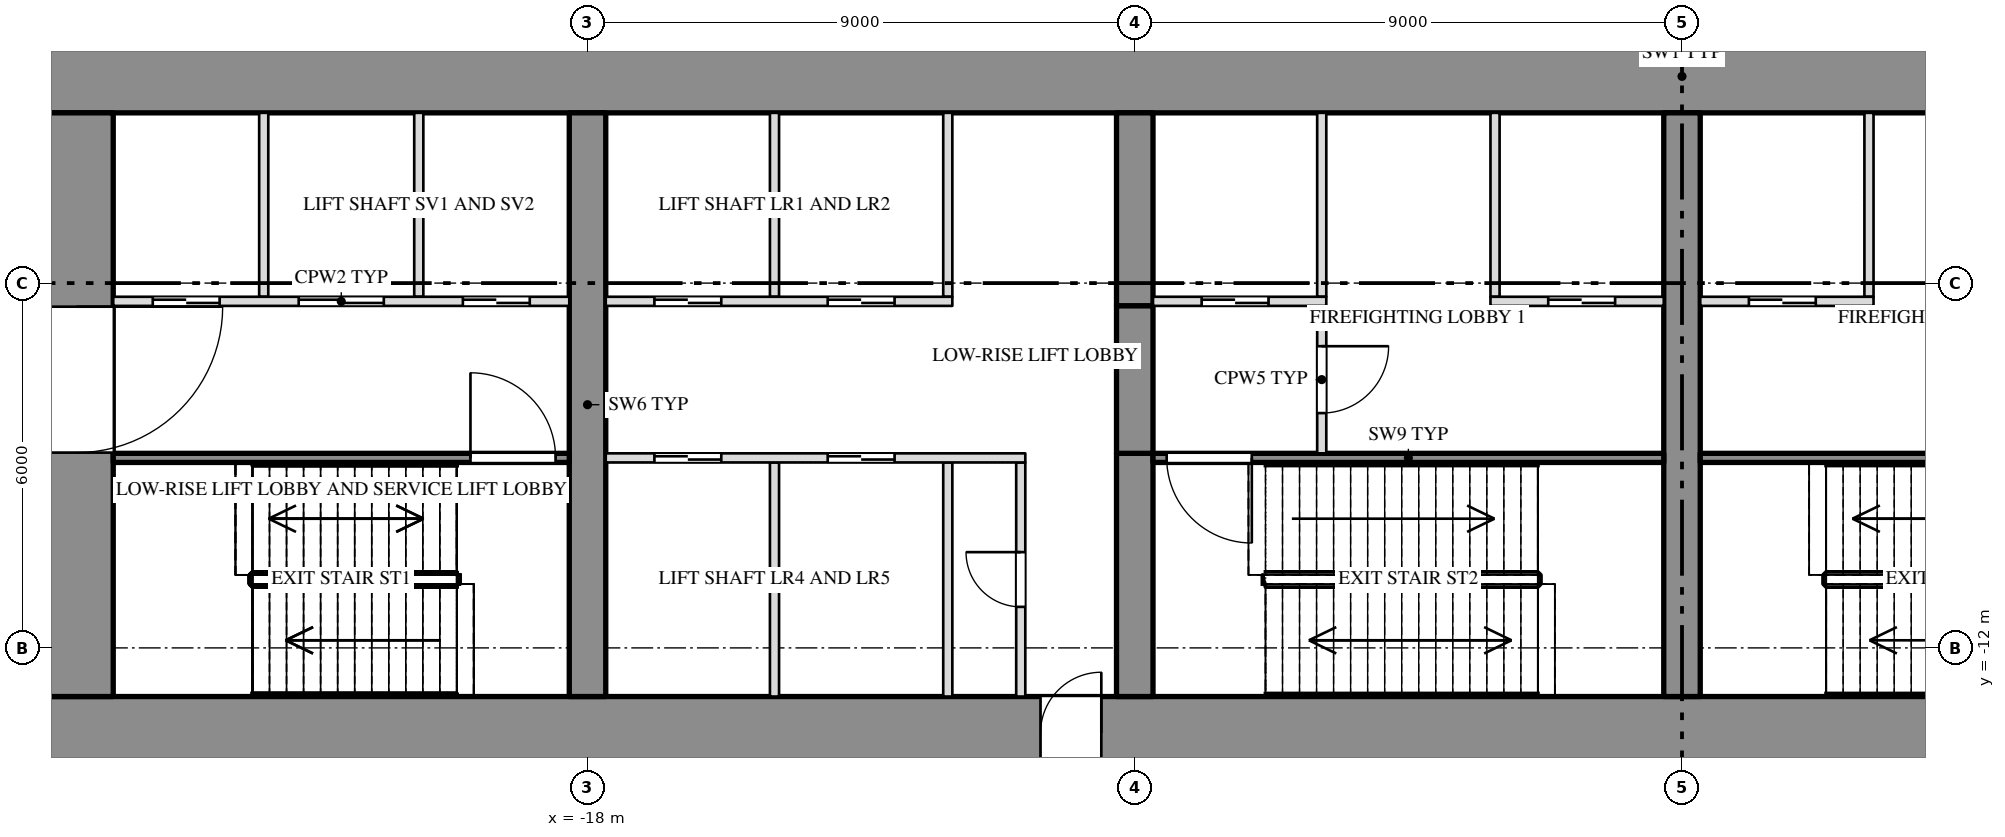
"""IFC4 building model, lengths in metres.
Left out: names, types, materials, properties, quantities, classifications, styles, units other than length and angle.
Written with IfcOpenShell. Run it as: python <this file> out.ifc"""

import sys

from ifc_helpers import new_model, si_unit, direction, frame, frame_2d, origin, place, context, subcontext, project, spatial, rectangle, extrude, element, fill, save


model = new_model("IFC4")
c1 = context("Model", 3, precision=1e-05, world=origin(), true_north=direction((0.0, 1.0)))
c2 = subcontext(c1, "Body", "Model", "MODEL_VIEW")
j1 = project(units=[si_unit("LENGTHUNIT", "METRE"), si_unit("PLANEANGLEUNIT", "RADIAN")], contexts=[c1])
p1 = place(None, origin())
s1 = spatial("IfcSite", under=j1, at=p1, CompositionType="ELEMENT")
p2 = place(p1, origin())
s2 = spatial("IfcBuilding", under=s1, at=p2, CompositionType="ELEMENT")
p3 = place(p2, frame((0.0, 0.0, 27.0)))
s3 = spatial("IfcBuildingStorey", under=s2, at=p3, CompositionType="ELEMENT", Elevation=27.0)
p4 = place(p3, frame((-27.0, -2.6, 0.0), z_axis=(0.0, 0.0, 1.0), x_axis=(1.0, 0.0, 0.0)))
e1 = element("IfcWall", 1, at=p4, inside=s3, PredefinedType="SHEAR", context=c2, shape_type="SweptSolid", body=[
    extrude(rectangle(XDim=54.0, YDim=1.2, at=frame_2d((27.0, 0.0))), origin(), (0.0, 0.0, 1.0), 5.7),
])
p5 = place(p3, frame((-27.0, -13.4, 0.0), z_axis=(0.0, 0.0, 1.0), x_axis=(1.0, 0.0, 0.0)))
e2 = element("IfcWall", 2, at=p5, inside=s3, PredefinedType="SHEAR", context=c2, shape_type="SweptSolid", body=[
    extrude(rectangle(XDim=54.0, YDim=1.2, at=frame_2d((27.0, 0.0))), origin(), (0.0, 0.0, 1.0), 5.7),
])
p6 = place(p5, frame((16.45, 0.0, 0.0)))
e3 = element("IfcOpeningElement", 3, at=p6, cuts=e2, PredefinedType="OPENING", context=c2, shape_type="SweptSolid", body=[
    extrude(rectangle(XDim=1.0, YDim=2.1, at=frame_2d((0.5, 1.05))), frame((0.0, 0.612, 0.0), z_axis=(0.0, -1.0, 0.0), x_axis=(1.0, 0.0, 0.0)), (0.0, 0.0, 1.0), 1.224),
])
p7 = place(p5, frame((36.55, 0.0, 0.0)))
e4 = element("IfcOpeningElement", 4, at=p7, cuts=e2, PredefinedType="OPENING", context=c2, shape_type="SweptSolid", body=[
    extrude(rectangle(XDim=1.0, YDim=2.1, at=frame_2d((0.5, 1.05))), frame((0.0, 0.612, 0.0), z_axis=(0.0, -1.0, 0.0), x_axis=(1.0, 0.0, 0.0)), (0.0, 0.0, 1.0), 1.224),
])
p8 = place(p3, frame((-26.4, -12.8, 0.0), z_axis=(0.0, 0.0, 1.0), x_axis=(0.0, 1.0, 0.0)))
e5 = element("IfcWall", 5, at=p8, inside=s3, PredefinedType="SHEAR", context=c2, shape_type="SweptSolid", body=[
    extrude(rectangle(XDim=9.6, YDim=1.2, at=frame_2d((4.8, 0.0))), origin(), (0.0, 0.0, 1.0), 5.7),
])
p9 = place(p8, frame((4.012, 0.0, 0.0)))
e6 = element("IfcOpeningElement", 6, at=p9, cuts=e5, PredefinedType="OPENING", context=c2, shape_type="SweptSolid", body=[
    extrude(rectangle(XDim=2.4, YDim=2.1, at=frame_2d((1.2, 1.05))), frame((0.0, 0.612, 0.0), z_axis=(0.0, -1.0, 0.0), x_axis=(1.0, 0.0, 0.0)), (0.0, 0.0, 1.0), 1.224),
])
p10 = place(p3, frame((-18.0, -12.8, 0.0), z_axis=(0.0, 0.0, 1.0), x_axis=(0.0, 1.0, 0.0)))
e7 = element("IfcWall", 7, at=p10, inside=s3, PredefinedType="SHEAR", context=c2, shape_type="SweptSolid", body=[
    extrude(rectangle(XDim=9.6, YDim=0.6, at=frame_2d((4.8, 0.0))), origin(), (0.0, 0.0, 1.0), 5.7),
])
p11 = place(p3, frame((-9.0, -12.8, 0.0), z_axis=(0.0, 0.0, 1.0), x_axis=(0.0, 1.0, 0.0)))
e8 = element("IfcWall", 8, at=p11, inside=s3, PredefinedType="SHEAR", context=c2, shape_type="SweptSolid", body=[
    extrude(rectangle(XDim=4.0, YDim=0.6, at=frame_2d((2.0, 0.0))), origin(), (0.0, 0.0, 1.0), 5.7),
])
p12 = place(p3, frame((-9.0, -6.375, 0.0), z_axis=(0.0, 0.0, 1.0), x_axis=(0.0, 1.0, 0.0)))
e9 = element("IfcWall", 9, at=p12, inside=s3, PredefinedType="SHEAR", context=c2, shape_type="SweptSolid", body=[
    extrude(rectangle(XDim=3.175, YDim=0.6, at=frame_2d((1.587, 0.0))), origin(), (0.0, 0.0, 1.0), 5.7),
])
p13 = place(p3, frame((-9.0, -8.8, 3.6), z_axis=(0.0, 0.0, 1.0), x_axis=(0.0, 1.0, 0.0)))
e10 = element("IfcWall", 10, at=p13, inside=s3, PredefinedType="SHEAR", context=c2, shape_type="SweptSolid", body=[
    extrude(rectangle(XDim=2.425, YDim=0.6, at=frame_2d((1.212, 0.0))), origin(), (0.0, 0.0, 1.0), 2.1),
])
p14 = place(p3, frame((0.0, -12.8, 0.0), z_axis=(0.0, 0.0, 1.0), x_axis=(0.0, 1.0, 0.0)))
e11 = element("IfcWall", 11, at=p14, inside=s3, PredefinedType="SHEAR", context=c2, shape_type="SweptSolid", body=[
    extrude(rectangle(XDim=9.6, YDim=0.6, at=frame_2d((4.8, 0.0))), origin(), (0.0, 0.0, 1.0), 5.7),
])
for number, where, z_axis, x_axis in (
    (12, (-20.775, -6.225, 0.0), (0.0, 0.0, 1.0), (0.0, 1.0, 0.0)),
    (13, (-23.325, -6.225, 0.0), (0.0, 0.0, 1.0), (0.0, 1.0, 0.0)),
    (14, (-12.075, -6.225, 0.0), (0.0, 0.0, 1.0), (0.0, 1.0, 0.0)),
    (15, (-14.925, -6.225, 0.0), (0.0, 0.0, 1.0), (0.0, 1.0, 0.0)),
    (16, (-3.075, -6.225, 0.0), (0.0, 0.0, 1.0), (0.0, 1.0, 0.0)),
    (17, (-5.925, -6.225, 0.0), (0.0, 0.0, 1.0), (0.0, 1.0, 0.0)),
    (18, (3.075, -6.225, 0.0), (0.0, 0.0, 1.0), (0.0, 1.0, 0.0)),
):
    element("IfcWall", number, at=place(p3, frame(where, z_axis=z_axis, x_axis=x_axis)), inside=s3, PredefinedType="PARTITIONING", context=c2, shape_type="SweptSolid", body=[
        extrude(rectangle(XDim=3.025, YDim=0.15, at=frame_2d((1.513, 0.0))), origin(), (0.0, 0.0, 1.0), 5.7),
    ])
p15 = place(p3, frame((-10.875, -12.8, 0.0), z_axis=(0.0, 0.0, 1.0), x_axis=(0.0, 1.0, 0.0)))
e19 = element("IfcWall", 19, at=p15, inside=s3, PredefinedType="PARTITIONING", context=c2, shape_type="SweptSolid", body=[
    extrude(rectangle(XDim=3.85, YDim=0.15, at=frame_2d((1.925, 0.0))), origin(), (0.0, 0.0, 1.0), 5.7),
])
p16 = place(p15, frame((1.475, 0.0, 0.0)))
e20 = element("IfcOpeningElement", 20, at=p16, cuts=e19, PredefinedType="OPENING", context=c2, shape_type="SweptSolid", body=[
    extrude(rectangle(XDim=0.9, YDim=2.1, at=frame_2d((0.45, 1.05))), frame((0.0, 0.087, 0.0), z_axis=(0.0, -1.0, 0.0), x_axis=(1.0, 0.0, 0.0)), (0.0, 0.0, 1.0), 0.174),
])
for number, where, z_axis, x_axis in (
    (21, (-12.075, -12.8, 0.0), (0.0, 0.0, 1.0), (0.0, 1.0, 0.0)),
    (22, (-14.925, -12.8, 0.0), (0.0, 0.0, 1.0), (0.0, 1.0, 0.0)),
):
    element("IfcWall", number, at=place(p3, frame(where, z_axis=z_axis, x_axis=x_axis)), inside=s3, PredefinedType="PARTITIONING", context=c2, shape_type="SweptSolid", body=[
        extrude(rectangle(XDim=3.85, YDim=0.15, at=frame_2d((1.925, 0.0))), origin(), (0.0, 0.0, 1.0), 5.7),
    ])
p17 = place(p3, frame((-5.925, -8.8, 0.0), z_axis=(0.0, 0.0, 1.0), x_axis=(0.0, 1.0, 0.0)))
e23 = element("IfcWall", 23, at=p17, inside=s3, PredefinedType="PARTITIONING", context=c2, shape_type="SweptSolid", body=[
    extrude(rectangle(XDim=2.425, YDim=0.15, at=frame_2d((1.212, 0.0))), origin(), (0.0, 0.0, 1.0), 5.7),
])
p18 = place(p17, frame((0.662, 0.0, 0.0)))
e24 = element("IfcOpeningElement", 24, at=p18, cuts=e23, PredefinedType="OPENING", context=c2, shape_type="SweptSolid", body=[
    extrude(rectangle(XDim=1.1, YDim=2.1, at=frame_2d((0.55, 1.05))), frame((0.0, 0.087, 0.0), z_axis=(0.0, -1.0, 0.0), x_axis=(1.0, 0.0, 0.0)), (0.0, 0.0, 1.0), 0.174),
])
p19 = place(p3, frame((-25.8, -6.3, 0.0), z_axis=(0.0, 0.0, 1.0), x_axis=(1.0, 0.0, 0.0)))
e25 = element("IfcWall", 25, at=p19, inside=s3, PredefinedType="PARTITIONING", context=c2, shape_type="SweptSolid", body=[
    extrude(rectangle(XDim=7.5, YDim=0.15, at=frame_2d((3.75, 0.0))), origin(), (0.0, 0.0, 1.0), 5.7),
])
p20 = place(p19, frame((0.65, 0.0, 0.0)))
e26 = element("IfcOpeningElement", 26, at=p20, cuts=e25, PredefinedType="OPENING", context=c2, shape_type="SweptSolid", body=[
    extrude(rectangle(XDim=1.1, YDim=2.1, at=frame_2d((0.55, 1.05))), frame((0.0, 0.087, 0.0), z_axis=(0.0, -1.0, 0.0), x_axis=(1.0, 0.0, 0.0)), (0.0, 0.0, 1.0), 0.174),
])
p21 = place(p19, frame((3.05, 0.0, 0.0)))
e27 = element("IfcOpeningElement", 27, at=p21, cuts=e25, PredefinedType="OPENING", context=c2, shape_type="SweptSolid", body=[
    extrude(rectangle(XDim=1.4, YDim=2.1, at=frame_2d((0.7, 1.05))), frame((0.0, 0.087, 0.0), z_axis=(0.0, -1.0, 0.0), x_axis=(1.0, 0.0, 0.0)), (0.0, 0.0, 1.0), 0.174),
])
p22 = place(p19, frame((5.75, 0.0, 0.0)))
e28 = element("IfcOpeningElement", 28, at=p22, cuts=e25, PredefinedType="OPENING", context=c2, shape_type="SweptSolid", body=[
    extrude(rectangle(XDim=1.1, YDim=2.1, at=frame_2d((0.55, 1.05))), frame((0.0, 0.087, 0.0), z_axis=(0.0, -1.0, 0.0), x_axis=(1.0, 0.0, 0.0)), (0.0, 0.0, 1.0), 0.174),
])
p23 = place(p3, frame((-17.7, -6.3, 0.0), z_axis=(0.0, 0.0, 1.0), x_axis=(1.0, 0.0, 0.0)))
e29 = element("IfcWall", 29, at=p23, inside=s3, PredefinedType="PARTITIONING", context=c2, shape_type="SweptSolid", body=[
    extrude(rectangle(XDim=5.7, YDim=0.15, at=frame_2d((2.85, 0.0))), origin(), (0.0, 0.0, 1.0), 5.7),
])
p24 = place(p23, frame((0.8, 0.0, 0.0)))
e30 = element("IfcOpeningElement", 30, at=p24, cuts=e29, PredefinedType="OPENING", context=c2, shape_type="SweptSolid", body=[
    extrude(rectangle(XDim=1.1, YDim=2.1, at=frame_2d((0.55, 1.05))), frame((0.0, 0.087, 0.0), z_axis=(0.0, -1.0, 0.0), x_axis=(1.0, 0.0, 0.0)), (0.0, 0.0, 1.0), 0.174),
])
p25 = place(p23, frame((3.65, 0.0, 0.0)))
e31 = element("IfcOpeningElement", 31, at=p25, cuts=e29, PredefinedType="OPENING", context=c2, shape_type="SweptSolid", body=[
    extrude(rectangle(XDim=1.1, YDim=2.1, at=frame_2d((0.55, 1.05))), frame((0.0, 0.087, 0.0), z_axis=(0.0, -1.0, 0.0), x_axis=(1.0, 0.0, 0.0)), (0.0, 0.0, 1.0), 0.174),
])
p26 = place(p3, frame((-8.7, -6.3, 0.0), z_axis=(0.0, 0.0, 1.0), x_axis=(1.0, 0.0, 0.0)))
e32 = element("IfcWall", 32, at=p26, inside=s3, PredefinedType="PARTITIONING", context=c2, shape_type="SweptSolid", body=[
    extrude(rectangle(XDim=2.85, YDim=0.15, at=frame_2d((1.425, 0.0))), origin(), (0.0, 0.0, 1.0), 5.7),
])
p27 = place(p26, frame((0.8, 0.0, 0.0)))
e33 = element("IfcOpeningElement", 33, at=p27, cuts=e32, PredefinedType="OPENING", context=c2, shape_type="SweptSolid", body=[
    extrude(rectangle(XDim=1.1, YDim=2.1, at=frame_2d((0.55, 1.05))), frame((0.0, 0.087, 0.0), z_axis=(0.0, -1.0, 0.0), x_axis=(1.0, 0.0, 0.0)), (0.0, 0.0, 1.0), 0.174),
])
p28 = place(p3, frame((-3.15, -6.3, 0.0), z_axis=(0.0, 0.0, 1.0), x_axis=(1.0, 0.0, 0.0)))
e34 = element("IfcWall", 34, at=p28, inside=s3, PredefinedType="PARTITIONING", context=c2, shape_type="SweptSolid", body=[
    extrude(rectangle(XDim=2.85, YDim=0.15, at=frame_2d((1.425, 0.0))), origin(), (0.0, 0.0, 1.0), 5.7),
])
p29 = place(p28, frame((0.95, 0.0, 0.0)))
e35 = element("IfcOpeningElement", 35, at=p29, cuts=e34, PredefinedType="OPENING", context=c2, shape_type="SweptSolid", body=[
    extrude(rectangle(XDim=1.1, YDim=2.1, at=frame_2d((0.55, 1.05))), frame((0.0, 0.087, 0.0), z_axis=(0.0, -1.0, 0.0), x_axis=(1.0, 0.0, 0.0)), (0.0, 0.0, 1.0), 0.174),
])
p30 = place(p3, frame((0.3, -6.3, 0.0), z_axis=(0.0, 0.0, 1.0), x_axis=(1.0, 0.0, 0.0)))
e36 = element("IfcWall", 36, at=p30, inside=s3, PredefinedType="PARTITIONING", context=c2, shape_type="SweptSolid", body=[
    extrude(rectangle(XDim=2.85, YDim=0.15, at=frame_2d((1.425, 0.0))), origin(), (0.0, 0.0, 1.0), 5.7),
])
p31 = place(p30, frame((0.8, 0.0, 0.0)))
e37 = element("IfcOpeningElement", 37, at=p31, cuts=e36, PredefinedType="OPENING", context=c2, shape_type="SweptSolid", body=[
    extrude(rectangle(XDim=1.1, YDim=2.1, at=frame_2d((0.55, 1.05))), frame((0.0, 0.087, 0.0), z_axis=(0.0, -1.0, 0.0), x_axis=(1.0, 0.0, 0.0)), (0.0, 0.0, 1.0), 0.174),
])
p32 = place(p3, frame((-25.8, -8.875, 0.0), z_axis=(0.0, 0.0, 1.0), x_axis=(1.0, 0.0, 0.0)))
e38 = element("IfcWall", 38, at=p32, inside=s3, PredefinedType="SHEAR", context=c2, shape_type="SweptSolid", body=[
    extrude(rectangle(XDim=7.5, YDim=0.15, at=frame_2d((3.75, 0.0))), origin(), (0.0, 0.0, 1.0), 5.7),
])
p33 = place(p32, frame((5.875, 0.0, 0.0)))
e39 = element("IfcOpeningElement", 39, at=p33, cuts=e38, PredefinedType="OPENING", context=c2, shape_type="SweptSolid", body=[
    extrude(rectangle(XDim=1.4, YDim=2.1, at=frame_2d((0.7, 1.05))), frame((0.0, 0.087, 0.0), z_axis=(0.0, -1.0, 0.0), x_axis=(1.0, 0.0, 0.0)), (0.0, 0.0, 1.0), 0.174),
])
p34 = place(p3, frame((-17.7, -8.875, 0.0), z_axis=(0.0, 0.0, 1.0), x_axis=(1.0, 0.0, 0.0)))
e40 = element("IfcWall", 40, at=p34, inside=s3, PredefinedType="PARTITIONING", context=c2, shape_type="SweptSolid", body=[
    extrude(rectangle(XDim=6.9, YDim=0.15, at=frame_2d((3.45, 0.0))), origin(), (0.0, 0.0, 1.0), 5.7),
])
p35 = place(p34, frame((0.8, 0.0, 0.0)))
e41 = element("IfcOpeningElement", 41, at=p35, cuts=e40, PredefinedType="OPENING", context=c2, shape_type="SweptSolid", body=[
    extrude(rectangle(XDim=1.1, YDim=2.1, at=frame_2d((0.55, 1.05))), frame((0.0, 0.087, 0.0), z_axis=(0.0, -1.0, 0.0), x_axis=(1.0, 0.0, 0.0)), (0.0, 0.0, 1.0), 0.174),
])
p36 = place(p34, frame((3.65, 0.0, 0.0)))
e42 = element("IfcOpeningElement", 42, at=p36, cuts=e40, PredefinedType="OPENING", context=c2, shape_type="SweptSolid", body=[
    extrude(rectangle(XDim=1.1, YDim=2.1, at=frame_2d((0.55, 1.05))), frame((0.0, 0.087, 0.0), z_axis=(0.0, -1.0, 0.0), x_axis=(1.0, 0.0, 0.0)), (0.0, 0.0, 1.0), 0.174),
])
p37 = place(p3, frame((-8.7, -8.875, 0.0), z_axis=(0.0, 0.0, 1.0), x_axis=(1.0, 0.0, 0.0)))
e43 = element("IfcWall", 43, at=p37, inside=s3, PredefinedType="SHEAR", context=c2, shape_type="SweptSolid", body=[
    extrude(rectangle(XDim=8.4, YDim=0.15, at=frame_2d((4.2, 0.0))), origin(), (0.0, 0.0, 1.0), 5.7),
])
p38 = place(p37, frame((0.225, 0.0, 0.0)))
e44 = element("IfcOpeningElement", 44, at=p38, cuts=e43, PredefinedType="OPENING", context=c2, shape_type="SweptSolid", body=[
    extrude(rectangle(XDim=1.4, YDim=2.1, at=frame_2d((0.7, 1.05))), frame((0.0, 0.087, 0.0), z_axis=(0.0, -1.0, 0.0), x_axis=(1.0, 0.0, 0.0)), (0.0, 0.0, 1.0), 0.174),
])
p39 = place(p3, frame((0.3, -8.875, 0.0), z_axis=(0.0, 0.0, 1.0), x_axis=(1.0, 0.0, 0.0)))
e45 = element("IfcWall", 45, at=p39, inside=s3, PredefinedType="SHEAR", context=c2, shape_type="SweptSolid", body=[
    extrude(rectangle(XDim=8.4, YDim=0.15, at=frame_2d((4.2, 0.0))), origin(), (0.0, 0.0, 1.0), 5.7),
])
p40 = place(p39, frame((6.775, 0.0, 0.0)))
e46 = element("IfcOpeningElement", 46, at=p40, cuts=e45, PredefinedType="OPENING", context=c2, shape_type="SweptSolid", body=[
    extrude(rectangle(XDim=1.4, YDim=2.1, at=frame_2d((0.7, 1.05))), frame((0.0, 0.087, 0.0), z_axis=(0.0, -1.0, 0.0), x_axis=(1.0, 0.0, 0.0)), (0.0, 0.0, 1.0), 0.174),
])
p41 = place(p9, origin())
e47 = element("IfcDoor", 47, at=p41, inside=s3, OperationType="DOUBLE_DOOR_SINGLE_SWING", PredefinedType="DOOR", context=c2, shape_type="SweptSolid", body=[
    extrude(rectangle(XDim=2.4, YDim=2.1, at=frame_2d((1.2, 1.05))), frame((0.0, 0.025, 0.0), z_axis=(0.0, -1.0, 0.0), x_axis=(1.0, 0.0, 0.0)), (0.0, 0.0, 1.0), 0.05),
])
fill(e6, e47)
p42 = place(p20, origin())
e48 = element("IfcDoor", 48, at=p42, inside=s3, OperationType="SLIDING_TO_RIGHT", PredefinedType="DOOR", context=c2, shape_type="SweptSolid", body=[
    extrude(rectangle(XDim=1.1, YDim=2.1, at=frame_2d((0.55, 1.05))), frame((0.0, 0.025, 0.0), z_axis=(0.0, -1.0, 0.0), x_axis=(1.0, 0.0, 0.0)), (0.0, 0.0, 1.0), 0.05),
])
fill(e26, e48)
p43 = place(p21, origin())
e49 = element("IfcDoor", 49, at=p43, inside=s3, OperationType="SLIDING_TO_LEFT", PredefinedType="DOOR", context=c2, shape_type="SweptSolid", body=[
    extrude(rectangle(XDim=1.4, YDim=2.1, at=frame_2d((0.7, 1.05))), frame((0.0, 0.025, 0.0), z_axis=(0.0, -1.0, 0.0), x_axis=(1.0, 0.0, 0.0)), (0.0, 0.0, 1.0), 0.05),
])
fill(e27, e49)
p44 = place(p22, origin())
e50 = element("IfcDoor", 50, at=p44, inside=s3, OperationType="SLIDING_TO_RIGHT", PredefinedType="DOOR", context=c2, shape_type="SweptSolid", body=[
    extrude(rectangle(XDim=1.1, YDim=2.1, at=frame_2d((0.55, 1.05))), frame((0.0, 0.025, 0.0), z_axis=(0.0, -1.0, 0.0), x_axis=(1.0, 0.0, 0.0)), (0.0, 0.0, 1.0), 0.05),
])
fill(e28, e50)
p45 = place(p33, origin())
e51 = element("IfcDoor", 51, at=p45, inside=s3, OperationType="DOUBLE_DOOR_SINGLE_SWING", PredefinedType="DOOR", context=c2, shape_type="SweptSolid", body=[
    extrude(rectangle(XDim=1.4, YDim=2.1, at=frame_2d((0.7, 1.05))), frame((0.0, 0.025, 0.0), z_axis=(0.0, -1.0, 0.0), x_axis=(1.0, 0.0, 0.0)), (0.0, 0.0, 1.0), 0.05),
])
fill(e39, e51)
p46 = place(p35, origin())
e52 = element("IfcDoor", 52, at=p46, inside=s3, OperationType="SLIDING_TO_RIGHT", PredefinedType="DOOR", context=c2, shape_type="SweptSolid", body=[
    extrude(rectangle(XDim=1.1, YDim=2.1, at=frame_2d((0.55, 1.05))), frame((0.0, 0.025, 0.0), z_axis=(0.0, -1.0, 0.0), x_axis=(1.0, 0.0, 0.0)), (0.0, 0.0, 1.0), 0.05),
])
fill(e41, e52)
p47 = place(p24, origin())
e53 = element("IfcDoor", 53, at=p47, inside=s3, OperationType="SLIDING_TO_LEFT", PredefinedType="DOOR", context=c2, shape_type="SweptSolid", body=[
    extrude(rectangle(XDim=1.1, YDim=2.1, at=frame_2d((0.55, 1.05))), frame((0.0, 0.025, 0.0), z_axis=(0.0, -1.0, 0.0), x_axis=(1.0, 0.0, 0.0)), (0.0, 0.0, 1.0), 0.05),
])
fill(e30, e53)
p48 = place(p36, origin())
e54 = element("IfcDoor", 54, at=p48, inside=s3, OperationType="SLIDING_TO_RIGHT", PredefinedType="DOOR", context=c2, shape_type="SweptSolid", body=[
    extrude(rectangle(XDim=1.1, YDim=2.1, at=frame_2d((0.55, 1.05))), frame((0.0, 0.025, 0.0), z_axis=(0.0, -1.0, 0.0), x_axis=(1.0, 0.0, 0.0)), (0.0, 0.0, 1.0), 0.05),
])
fill(e42, e54)
p49 = place(p25, origin())
e55 = element("IfcDoor", 55, at=p49, inside=s3, OperationType="SLIDING_TO_LEFT", PredefinedType="DOOR", context=c2, shape_type="SweptSolid", body=[
    extrude(rectangle(XDim=1.1, YDim=2.1, at=frame_2d((0.55, 1.05))), frame((0.0, 0.025, 0.0), z_axis=(0.0, -1.0, 0.0), x_axis=(1.0, 0.0, 0.0)), (0.0, 0.0, 1.0), 0.05),
])
fill(e31, e55)
p50 = place(p16, origin())
e56 = element("IfcDoor", 56, at=p50, inside=s3, OperationType="SINGLE_SWING_RIGHT", PredefinedType="DOOR", context=c2, shape_type="SweptSolid", body=[
    extrude(rectangle(XDim=0.9, YDim=2.1, at=frame_2d((0.45, 1.05))), frame((0.0, 0.025, 0.0), z_axis=(0.0, -1.0, 0.0), x_axis=(1.0, 0.0, 0.0)), (0.0, 0.0, 1.0), 0.05),
])
fill(e20, e56)
p51 = place(p6, origin())
e57 = element("IfcDoor", 57, at=p51, inside=s3, OperationType="SINGLE_SWING_RIGHT", PredefinedType="DOOR", context=c2, shape_type="SweptSolid", body=[
    extrude(rectangle(XDim=1.0, YDim=2.1, at=frame_2d((0.5, 1.05))), frame((0.0, 0.025, 0.0), z_axis=(0.0, -1.0, 0.0), x_axis=(1.0, 0.0, 0.0)), (0.0, 0.0, 1.0), 0.05),
])
fill(e3, e57)
p52 = place(p38, origin())
e58 = element("IfcDoor", 58, at=p52, inside=s3, OperationType="DOUBLE_DOOR_SINGLE_SWING", PredefinedType="DOOR", context=c2, shape_type="SweptSolid", body=[
    extrude(rectangle(XDim=1.4, YDim=2.1, at=frame_2d((0.7, 1.05))), frame((0.0, 0.025, 0.0), z_axis=(0.0, -1.0, 0.0), x_axis=(1.0, 0.0, 0.0)), (0.0, 0.0, 1.0), 0.05),
])
fill(e44, e58)
p53 = place(p27, origin())
e59 = element("IfcDoor", 59, at=p53, inside=s3, OperationType="SLIDING_TO_LEFT", PredefinedType="DOOR", context=c2, shape_type="SweptSolid", body=[
    extrude(rectangle(XDim=1.1, YDim=2.1, at=frame_2d((0.55, 1.05))), frame((0.0, 0.025, 0.0), z_axis=(0.0, -1.0, 0.0), x_axis=(1.0, 0.0, 0.0)), (0.0, 0.0, 1.0), 0.05),
])
fill(e33, e59)
p54 = place(p18, origin())
e60 = element("IfcDoor", 60, at=p54, inside=s3, OperationType="SINGLE_SWING_LEFT", PredefinedType="DOOR", context=c2, shape_type="SweptSolid", body=[
    extrude(rectangle(XDim=1.1, YDim=2.1, at=frame_2d((0.55, 1.05))), frame((0.0, 0.025, 0.0), z_axis=(0.0, -1.0, 0.0), x_axis=(1.0, 0.0, 0.0)), (0.0, 0.0, 1.0), 0.05),
])
fill(e24, e60)
p55 = place(p29, origin())
e61 = element("IfcDoor", 61, at=p55, inside=s3, OperationType="SLIDING_TO_LEFT", PredefinedType="DOOR", context=c2, shape_type="SweptSolid", body=[
    extrude(rectangle(XDim=1.1, YDim=2.1, at=frame_2d((0.55, 1.05))), frame((0.0, 0.025, 0.0), z_axis=(0.0, -1.0, 0.0), x_axis=(1.0, 0.0, 0.0)), (0.0, 0.0, 1.0), 0.05),
])
fill(e35, e61)
p56 = place(p31, origin())
e62 = element("IfcDoor", 62, at=p56, inside=s3, OperationType="SLIDING_TO_RIGHT", PredefinedType="DOOR", context=c2, shape_type="SweptSolid", body=[
    extrude(rectangle(XDim=1.1, YDim=2.1, at=frame_2d((0.55, 1.05))), frame((0.0, 0.025, 0.0), z_axis=(0.0, -1.0, 0.0), x_axis=(1.0, 0.0, 0.0)), (0.0, 0.0, 1.0), 0.05),
])
fill(e37, e62)
save(model, sys.argv[1])
